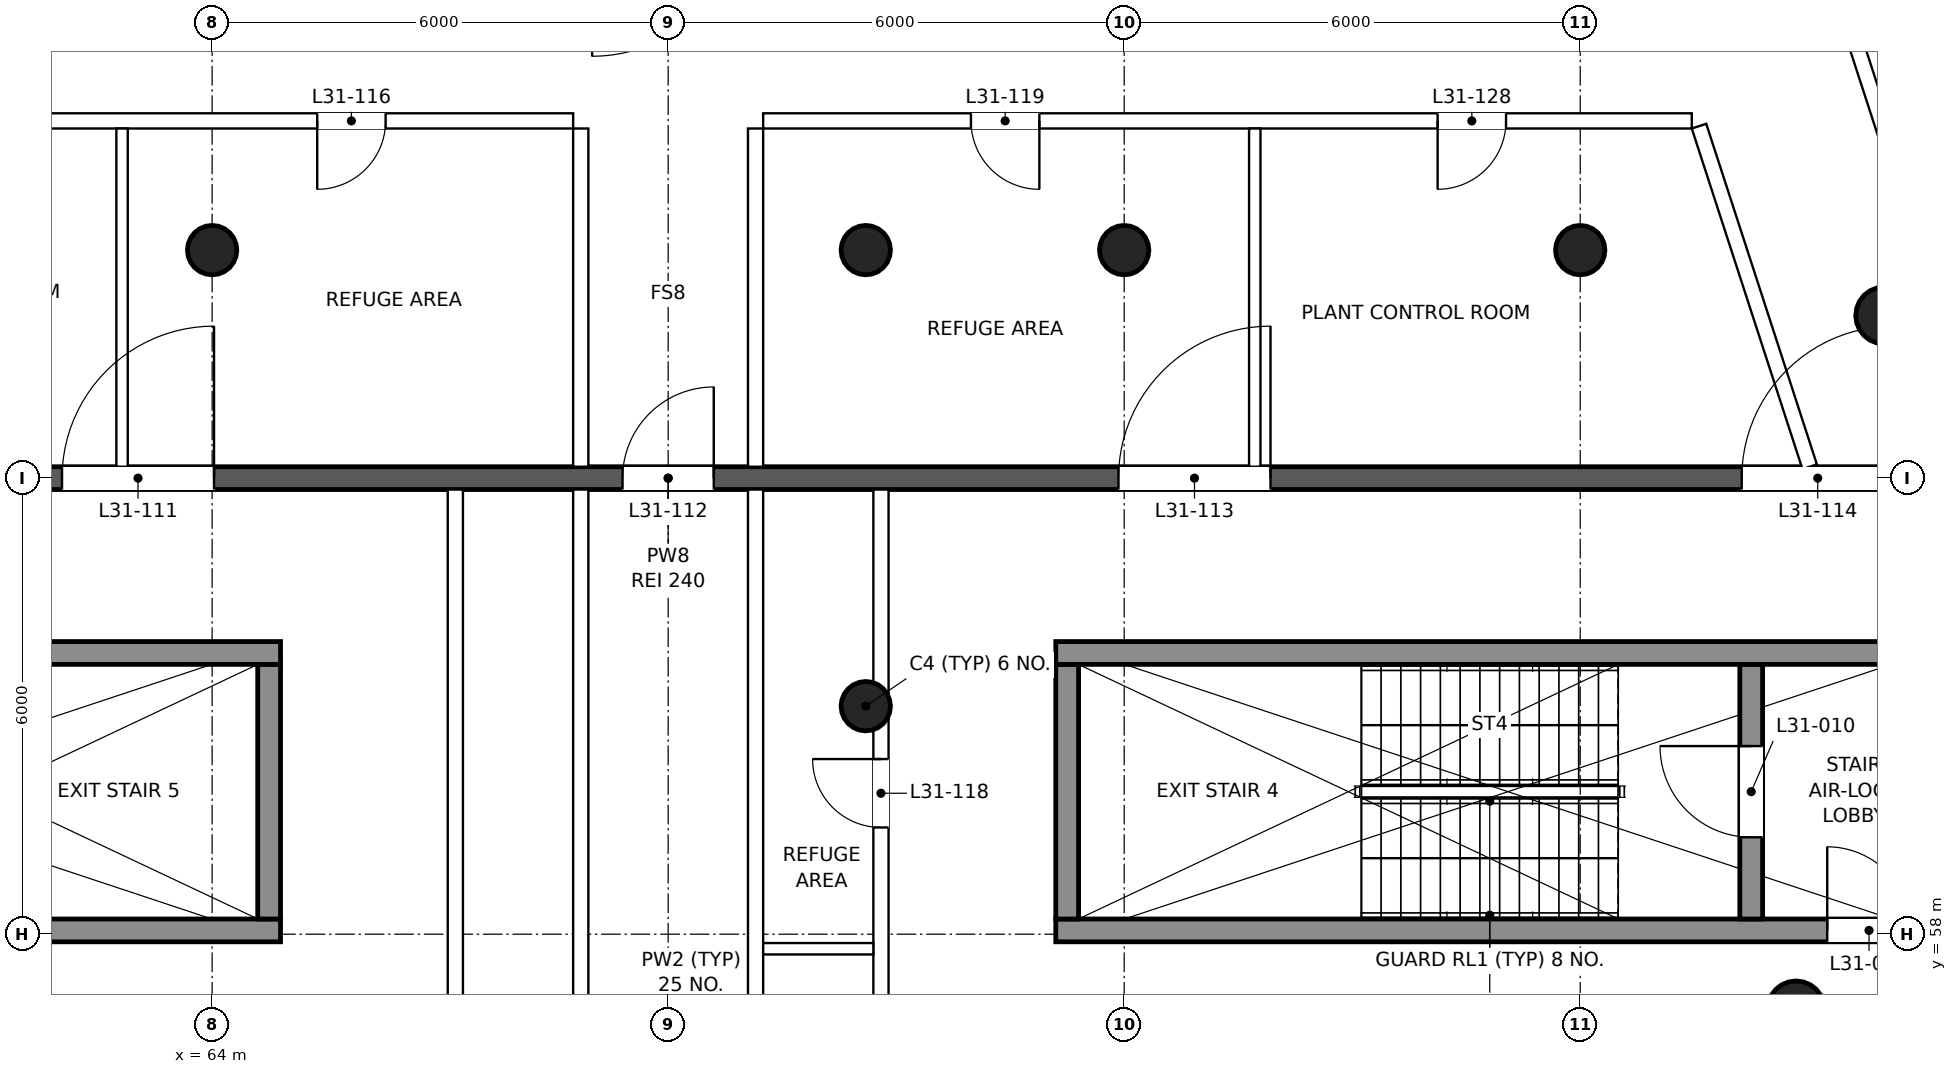
"""IFC4 building model, lengths in metres.
Left out: names, types, materials, properties, quantities, classifications, styles, units other than length and angle.
Written with IfcOpenShell. Run it as: python <this file> out.ifc"""

import sys

from ifc_helpers import new_model, si_unit, direction, frame, frame_2d, origin, origin_2d, place, context, subcontext, project, spatial, rectangle, circle, extrude, element, fill, save


model = new_model("IFC4")
c1 = context("Model", 3, precision=1e-05, world=origin(), true_north=direction((0.0, 1.0)))
c2 = subcontext(c1, "Body", "Model", "MODEL_VIEW")
j1 = project(units=[si_unit("LENGTHUNIT", "METRE"), si_unit("PLANEANGLEUNIT", "RADIAN")], contexts=[c1])
p1 = place(None, origin())
s1 = spatial("IfcSite", under=j1, at=p1, CompositionType="ELEMENT")
p2 = place(p1, origin())
s2 = spatial("IfcBuilding", under=s1, at=p2, CompositionType="ELEMENT")
p3 = place(p2, frame((0.0, 0.0, 137.6)))
s3 = spatial("IfcBuildingStorey", under=s2, at=p3, CompositionType="ELEMENT", Elevation=137.6)
for number, where, z_axis, x_axis in (
    (1, (84.84, 57.01, 0.0), (0.0, 0.0, 1.0), (1.0, 0.0, 0.0)),
    (2, (86.0, 66.14, 0.0), (0.0, 0.0, 1.0), (1.0, 0.0, 0.0)),
):
    element("IfcColumn", number, at=place(p3, frame(where, z_axis=z_axis, x_axis=x_axis)), inside=s3, PredefinedType="COLUMN", context=c2, shape_type="SweptSolid", body=[
        extrude(circle(Radius=0.375, at=origin_2d()), origin(), (0.0, 0.0, 1.0), 5.0),
    ])
for number, where, z_axis, x_axis in (
    (3, (64.0, 67.0, 0.0), (0.0, 0.0, 1.0), (1.0, 0.0, 0.0)),
    (4, (72.6, 61.0, 0.0), (0.0, 0.0, 1.0), (1.0, 0.0, 0.0)),
    (5, (72.6, 67.0, 0.0), (0.0, 0.0, 1.0), (1.0, 0.0, 0.0)),
    (6, (76.0, 67.0, 0.0), (0.0, 0.0, 1.0), (1.0, 0.0, 0.0)),
    (7, (82.0, 67.0, 0.0), (0.0, 0.0, 1.0), (1.0, 0.0, 0.0)),
):
    element("IfcColumn", number, at=place(p3, frame(where, z_axis=z_axis, x_axis=x_axis)), inside=s3, PredefinedType="COLUMN", context=c2, shape_type="SweptSolid", body=[
        extrude(circle(Radius=0.325, at=origin_2d()), origin(), (0.0, 0.0, 1.0), 5.0),
    ])
p4 = place(p3, frame((53.0, 58.05, 0.0), z_axis=(0.0, 0.0, 1.0), x_axis=(1.0, 0.0, 0.0)))
e8 = element("IfcWall", 8, at=p4, inside=s3, PredefinedType="SHEAR", context=c2, shape_type="SweptSolid", body=[
    extrude(rectangle(XDim=11.9, YDim=0.3, at=frame_2d((5.95, 0.0))), origin(), (0.0, 0.0, 1.0), 5.0),
])
p5 = place(p4, frame((0.65, 0.0, 0.0)))
e9 = element("IfcOpeningElement", 9, at=p5, cuts=e8, PredefinedType="OPENING", context=c2, shape_type="SweptSolid", body=[
    extrude(rectangle(XDim=1.1, YDim=2.1, at=frame_2d((0.55, 1.05))), frame((0.0, 0.16, 0.0), z_axis=(0.0, -1.0, 0.0), x_axis=(1.0, 0.0, 0.0)), (0.0, 0.0, 1.0), 0.32),
])
p6 = place(p3, frame((75.1, 58.05, 0.0), z_axis=(0.0, 0.0, 1.0), x_axis=(1.0, 0.0, 0.0)))
e10 = element("IfcWall", 10, at=p6, inside=s3, PredefinedType="SHEAR", context=c2, shape_type="SweptSolid", body=[
    extrude(rectangle(XDim=11.9, YDim=0.3, at=frame_2d((5.95, 0.0))), origin(), (0.0, 0.0, 1.0), 5.0),
])
p7 = place(p6, frame((10.15, 0.0, 0.0)))
e11 = element("IfcOpeningElement", 11, at=p7, cuts=e10, PredefinedType="OPENING", context=c2, shape_type="SweptSolid", body=[
    extrude(rectangle(XDim=1.1, YDim=2.1, at=frame_2d((0.55, 1.05))), frame((0.0, 0.16, 0.0), z_axis=(0.0, -1.0, 0.0), x_axis=(1.0, 0.0, 0.0)), (0.0, 0.0, 1.0), 0.32),
])
for number, where, z_axis, x_axis in (
    (12, (64.75, 58.2, 0.0), (0.0, 0.0, 1.0), (0.0, 1.0, 0.0)),
    (13, (75.25, 58.2, 0.0), (0.0, 0.0, 1.0), (0.0, 1.0, 0.0)),
):
    element("IfcWall", number, at=place(p3, frame(where, z_axis=z_axis, x_axis=x_axis)), inside=s3, PredefinedType="SHEAR", context=c2, shape_type="SweptSolid", body=[
        extrude(rectangle(XDim=3.35, YDim=0.3, at=frame_2d((1.675, 0.0))), origin(), (0.0, 0.0, 1.0), 5.0),
    ])
p8 = place(p3, frame((84.25, 58.2, 0.0), z_axis=(0.0, 0.0, 1.0), x_axis=(0.0, 1.0, 0.0)))
e14 = element("IfcWall", 14, at=p8, inside=s3, PredefinedType="SHEAR", context=c2, shape_type="SweptSolid", body=[
    extrude(rectangle(XDim=3.35, YDim=0.3, at=frame_2d((1.675, 0.0))), origin(), (0.0, 0.0, 1.0), 5.0),
])
p9 = place(p8, frame((1.075, 0.0, 0.0)))
e15 = element("IfcOpeningElement", 15, at=p9, cuts=e14, PredefinedType="OPENING", context=c2, shape_type="SweptSolid", body=[
    extrude(rectangle(XDim=1.2, YDim=2.1, at=frame_2d((0.6, 1.05))), frame((0.0, 0.16, 0.0), z_axis=(0.0, -1.0, 0.0), x_axis=(1.0, 0.0, 0.0)), (0.0, 0.0, 1.0), 0.32),
])
for number, where, z_axis, x_axis in (
    (16, (53.0, 61.7, 0.0), (0.0, 0.0, 1.0), (1.0, 0.0, 0.0)),
    (17, (75.1, 61.7, 0.0), (0.0, 0.0, 1.0), (1.0, 0.0, 0.0)),
):
    element("IfcWall", number, at=place(p3, frame(where, z_axis=z_axis, x_axis=x_axis)), inside=s3, PredefinedType="SHEAR", context=c2, shape_type="SweptSolid", body=[
        extrude(rectangle(XDim=11.9, YDim=0.3, at=frame_2d((5.95, 0.0))), origin(), (0.0, 0.0, 1.0), 5.0),
    ])
p10 = place(p3, frame((45.49, 64.0, 0.0), z_axis=(0.0, 0.0, 1.0), x_axis=(1.0, 0.0, 0.0)))
e18 = element("IfcWall", 18, at=p10, inside=s3, PredefinedType="PARTITIONING", context=c2, shape_type="SweptSolid", body=[
    extrude(rectangle(XDim=49.02, YDim=0.3, at=frame_2d((24.51, 0.0))), origin(), (0.0, 0.0, 1.0), 3.9),
])
p11 = place(p10, frame((8.385, 0.0, 0.0)))
e19 = element("IfcOpeningElement", 19, at=p11, cuts=e18, PredefinedType="OPENING", context=c2, shape_type="SweptSolid", body=[
    extrude(rectangle(XDim=2.0, YDim=2.1, at=frame_2d((1.0, 1.05))), frame((0.0, 0.16, 0.0), z_axis=(0.0, -1.0, 0.0), x_axis=(1.0, 0.0, 0.0)), (0.0, 0.0, 1.0), 0.32),
])
p12 = place(p10, frame((16.535, 0.0, 0.0)))
e20 = element("IfcOpeningElement", 20, at=p12, cuts=e18, PredefinedType="OPENING", context=c2, shape_type="SweptSolid", body=[
    extrude(rectangle(XDim=2.0, YDim=2.1, at=frame_2d((1.0, 1.05))), frame((0.0, 0.16, 0.0), z_axis=(0.0, -1.0, 0.0), x_axis=(1.0, 0.0, 0.0)), (0.0, 0.0, 1.0), 0.32),
])
p13 = place(p10, frame((23.91, 0.0, 0.0)))
e21 = element("IfcOpeningElement", 21, at=p13, cuts=e18, PredefinedType="OPENING", context=c2, shape_type="SweptSolid", body=[
    extrude(rectangle(XDim=1.2, YDim=2.1, at=frame_2d((0.6, 1.05))), frame((0.0, 0.16, 0.0), z_axis=(0.0, -1.0, 0.0), x_axis=(1.0, 0.0, 0.0)), (0.0, 0.0, 1.0), 0.32),
])
p14 = place(p10, frame((30.435, 0.0, 0.0)))
e22 = element("IfcOpeningElement", 22, at=p14, cuts=e18, PredefinedType="OPENING", context=c2, shape_type="SweptSolid", body=[
    extrude(rectangle(XDim=2.0, YDim=2.1, at=frame_2d((1.0, 1.05))), frame((0.0, 0.16, 0.0), z_axis=(0.0, -1.0, 0.0), x_axis=(1.0, 0.0, 0.0)), (0.0, 0.0, 1.0), 0.32),
])
p15 = place(p10, frame((38.635, 0.0, 0.0)))
e23 = element("IfcOpeningElement", 23, at=p15, cuts=e18, PredefinedType="OPENING", context=c2, shape_type="SweptSolid", body=[
    extrude(rectangle(XDim=2.0, YDim=2.1, at=frame_2d((1.0, 1.05))), frame((0.0, 0.16, 0.0), z_axis=(0.0, -1.0, 0.0), x_axis=(1.0, 0.0, 0.0)), (0.0, 0.0, 1.0), 0.32),
])
p16 = place(p3, frame((83.305, 76.868, 0.0), z_axis=(0.0, 0.0, 1.0), x_axis=(0.309005574406, -0.951060226792, 0.0)))
e24 = element("IfcWall", 24, at=p16, inside=s3, PredefinedType="PARTITIONING", context=c2, shape_type="SweptSolid", body=[
    extrude(rectangle(XDim=13.373, YDim=0.2, at=frame_2d((6.687, 0.0))), origin(), (0.0, 0.0, 1.0), 4.6),
])
p17 = place(p16, frame((1.841, 0.0, 0.0)))
e25 = element("IfcOpeningElement", 25, at=p17, cuts=e24, PredefinedType="OPENING", context=c2, shape_type="SweptSolid", body=[
    extrude(rectangle(XDim=0.9, YDim=2.1, at=frame_2d((0.45, 1.05))), frame((0.0, 0.11, 0.0), z_axis=(0.0, -1.0, 0.0), x_axis=(1.0, 0.0, 0.0)), (0.0, 0.0, 1.0), 0.22),
])
p18 = place(p16, frame((6.236, 0.0, 0.0)))
e26 = element("IfcOpeningElement", 26, at=p18, cuts=e24, PredefinedType="OPENING", context=c2, shape_type="SweptSolid", body=[
    extrude(rectangle(XDim=0.9, YDim=2.1, at=frame_2d((0.45, 1.05))), frame((0.0, 0.11, 0.0), z_axis=(0.0, -1.0, 0.0), x_axis=(1.0, 0.0, 0.0)), (0.0, 0.0, 1.0), 0.22),
])
p19 = place(p3, frame((85.019, 64.15, 0.0), z_axis=(0.0, 0.0, 1.0), x_axis=(-0.309036861841, 0.951050060735, 0.0)))
e27 = element("IfcWall", 27, at=p19, inside=s3, PredefinedType="PARTITIONING", context=c2, shape_type="SweptSolid", body=[
    extrude(rectangle(XDim=4.712, YDim=0.2, at=frame_2d((2.356, 0.0))), origin(), (0.0, 0.0, 1.0), 4.6),
])
p20 = place(p3, frame((83.468, 68.7, 0.0), z_axis=(0.0, 0.0, 1.0), x_axis=(-1.0, 0.0, 0.0)))
e28 = element("IfcWall", 28, at=p20, inside=s3, PredefinedType="PARTITIONING", context=c2, shape_type="SweptSolid", body=[
    extrude(rectangle(XDim=12.218, YDim=0.2, at=frame_2d((6.109, 0.0))), origin(), (0.0, 0.0, 1.0), 4.6),
])
p21 = place(p20, frame((8.584, 0.0, 0.0)))
e29 = element("IfcOpeningElement", 29, at=p21, cuts=e28, PredefinedType="OPENING", context=c2, shape_type="SweptSolid", body=[
    extrude(rectangle(XDim=0.9, YDim=2.1, at=frame_2d((0.45, 1.05))), frame((0.0, 0.11, 0.0), z_axis=(0.0, -1.0, 0.0), x_axis=(1.0, 0.0, 0.0)), (0.0, 0.0, 1.0), 0.22),
])
p22 = place(p20, frame((2.444, 0.0, 0.0)))
e30 = element("IfcOpeningElement", 30, at=p22, cuts=e28, PredefinedType="OPENING", context=c2, shape_type="SweptSolid", body=[
    extrude(rectangle(XDim=0.9, YDim=2.1, at=frame_2d((0.45, 1.05))), frame((0.0, 0.11, 0.0), z_axis=(0.0, -1.0, 0.0), x_axis=(1.0, 0.0, 0.0)), (0.0, 0.0, 1.0), 0.22),
])
p23 = place(p3, frame((71.15, 68.6, 0.0), z_axis=(0.0, 0.0, 1.0), x_axis=(0.0, -1.0, 0.0)))
e31 = element("IfcWall", 31, at=p23, inside=s3, PredefinedType="PARTITIONING", context=c2, shape_type="SweptSolid", body=[
    extrude(rectangle(XDim=4.45, YDim=0.2, at=frame_2d((2.225, 0.0))), origin(), (0.0, 0.0, 1.0), 4.6),
])
p24 = place(p3, frame((71.15, 63.85, 0.0), z_axis=(0.0, 0.0, 1.0), x_axis=(0.0, -1.0, 0.0)))
e32 = element("IfcWall", 32, at=p24, inside=s3, PredefinedType="PARTITIONING", context=c2, shape_type="SweptSolid", body=[
    extrude(rectangle(XDim=14.429, YDim=0.2, at=frame_2d((7.215, 0.0))), origin(), (0.0, 0.0, 1.0), 4.6),
])
p25 = place(p3, frame((72.8, 55.7, 0.0), z_axis=(0.0, 0.0, 1.0), x_axis=(0.0, 1.0, 0.0)))
e33 = element("IfcWall", 33, at=p25, inside=s3, PredefinedType="PARTITIONING", context=c2, shape_type="SweptSolid", body=[
    extrude(rectangle(XDim=8.15, YDim=0.2, at=frame_2d((4.075, 0.0))), origin(), (0.0, 0.0, 1.0), 4.6),
])
p26 = place(p25, frame((3.704, 0.0, 0.0)))
e34 = element("IfcOpeningElement", 34, at=p26, cuts=e33, PredefinedType="OPENING", context=c2, shape_type="SweptSolid", body=[
    extrude(rectangle(XDim=0.9, YDim=2.1, at=frame_2d((0.45, 1.05))), frame((0.0, 0.11, 0.0), z_axis=(0.0, -1.0, 0.0), x_axis=(1.0, 0.0, 0.0)), (0.0, 0.0, 1.0), 0.22),
])
p27 = place(p3, frame((68.85, 49.421, 0.0), z_axis=(0.0, 0.0, 1.0), x_axis=(0.0, 1.0, 0.0)))
e35 = element("IfcWall", 35, at=p27, inside=s3, PredefinedType="PARTITIONING", context=c2, shape_type="SweptSolid", body=[
    extrude(rectangle(XDim=14.429, YDim=0.2, at=frame_2d((7.215, 0.0))), origin(), (0.0, 0.0, 1.0), 4.6),
])
p28 = place(p27, frame((6.818, 0.0, 0.0)))
e36 = element("IfcOpeningElement", 36, at=p28, cuts=e35, PredefinedType="OPENING", context=c2, shape_type="SweptSolid", body=[
    extrude(rectangle(XDim=0.9, YDim=2.1, at=frame_2d((0.45, 1.05))), frame((0.0, 0.11, 0.0), z_axis=(0.0, -1.0, 0.0), x_axis=(1.0, 0.0, 0.0)), (0.0, 0.0, 1.0), 0.22),
])
p29 = place(p3, frame((68.85, 64.15, 0.0), z_axis=(0.0, 0.0, 1.0), x_axis=(0.0, 1.0, 0.0)))
e37 = element("IfcWall", 37, at=p29, inside=s3, PredefinedType="PARTITIONING", context=c2, shape_type="SweptSolid", body=[
    extrude(rectangle(XDim=4.45, YDim=0.2, at=frame_2d((2.225, 0.0))), origin(), (0.0, 0.0, 1.0), 4.6),
])
p30 = place(p3, frame((68.75, 68.7, 0.0), z_axis=(0.0, 0.0, 1.0), x_axis=(-1.0, 0.0, 0.0)))
e38 = element("IfcWall", 38, at=p30, inside=s3, PredefinedType="PARTITIONING", context=c2, shape_type="SweptSolid", body=[
    extrude(rectangle(XDim=12.218, YDim=0.2, at=frame_2d((6.109, 0.0))), origin(), (0.0, 0.0, 1.0), 4.6),
])
p31 = place(p30, frame((2.468, 0.0, 0.0)))
e39 = element("IfcOpeningElement", 39, at=p31, cuts=e38, PredefinedType="OPENING", context=c2, shape_type="SweptSolid", body=[
    extrude(rectangle(XDim=0.9, YDim=2.1, at=frame_2d((0.45, 1.05))), frame((0.0, 0.11, 0.0), z_axis=(0.0, -1.0, 0.0), x_axis=(1.0, 0.0, 0.0)), (0.0, 0.0, 1.0), 0.22),
])
p32 = place(p30, frame((8.467, 0.0, 0.0)))
e40 = element("IfcOpeningElement", 40, at=p32, cuts=e38, PredefinedType="OPENING", context=c2, shape_type="SweptSolid", body=[
    extrude(rectangle(XDim=0.9, YDim=2.1, at=frame_2d((0.45, 1.05))), frame((0.0, 0.11, 0.0), z_axis=(0.0, -1.0, 0.0), x_axis=(1.0, 0.0, 0.0)), (0.0, 0.0, 1.0), 0.22),
])
p33 = place(p3, frame((67.2, 63.85, 0.0), z_axis=(0.0, 0.0, 1.0), x_axis=(0.0, -1.0, 0.0)))
e41 = element("IfcWall", 41, at=p33, inside=s3, PredefinedType="PARTITIONING", context=c2, shape_type="SweptSolid", body=[
    extrude(rectangle(XDim=8.15, YDim=0.2, at=frame_2d((4.075, 0.0))), origin(), (0.0, 0.0, 1.0), 4.6),
])
p34 = place(p3, frame((62.815, 64.15, 0.0), z_axis=(0.0, 0.0, 1.0), x_axis=(0.0, 1.0, 0.0)))
e42 = element("IfcWall", 42, at=p34, inside=s3, PredefinedType="PARTITIONING", context=c2, shape_type="SweptSolid", body=[
    extrude(rectangle(XDim=4.45, YDim=0.15, at=frame_2d((2.225, 0.0))), origin(), (0.0, 0.0, 1.0), 4.6),
])
p35 = place(p3, frame((71.25, 57.809, 0.0), z_axis=(0.0, 0.0, 1.0), x_axis=(1.0, 0.0, 0.0)))
e43 = element("IfcWall", 43, at=p35, inside=s3, PredefinedType="PARTITIONING", context=c2, shape_type="SweptSolid", body=[
    extrude(rectangle(XDim=1.45, YDim=0.15, at=frame_2d((0.725, 0.0))), origin(), (0.0, 0.0, 1.0), 4.6),
])
p36 = place(p3, frame((77.718, 64.15, 0.0), z_axis=(0.0, 0.0, 1.0), x_axis=(0.0, 1.0, 0.0)))
e44 = element("IfcWall", 44, at=p36, inside=s3, PredefinedType="PARTITIONING", context=c2, shape_type="SweptSolid", body=[
    extrude(rectangle(XDim=4.45, YDim=0.15, at=frame_2d((2.225, 0.0))), origin(), (0.0, 0.0, 1.0), 4.6),
])
p37 = place(p7, origin())
e45 = element("IfcDoor", 45, at=p37, inside=s3, OperationType="SINGLE_SWING_LEFT", PredefinedType="DOOR", context=c2, shape_type="SweptSolid", body=[
    extrude(rectangle(XDim=1.1, YDim=2.1, at=frame_2d((0.55, 1.05))), frame((0.0, 0.025, 0.0), z_axis=(0.0, -1.0, 0.0), x_axis=(1.0, 0.0, 0.0)), (0.0, 0.0, 1.0), 0.05),
])
fill(e11, e45)
p38 = place(p9, origin())
e46 = element("IfcDoor", 46, at=p38, inside=s3, OperationType="SINGLE_SWING_RIGHT", PredefinedType="DOOR", context=c2, shape_type="SweptSolid", body=[
    extrude(rectangle(XDim=1.2, YDim=2.1, at=frame_2d((0.6, 1.05))), frame((0.0, 0.025, 0.0), z_axis=(0.0, -1.0, 0.0), x_axis=(1.0, 0.0, 0.0)), (0.0, 0.0, 1.0), 0.05),
])
fill(e15, e46)
p39 = place(p12, origin())
e47 = element("IfcDoor", 47, at=p39, inside=s3, OperationType="DOUBLE_DOOR_SINGLE_SWING", PredefinedType="DOOR", context=c2, shape_type="SweptSolid", body=[
    extrude(rectangle(XDim=2.0, YDim=2.1, at=frame_2d((1.0, 1.05))), frame((0.0, 0.025, 0.0), z_axis=(0.0, -1.0, 0.0), x_axis=(1.0, 0.0, 0.0)), (0.0, 0.0, 1.0), 0.05),
])
fill(e20, e47)
p40 = place(p13, origin())
e48 = element("IfcDoor", 48, at=p40, inside=s3, OperationType="SINGLE_SWING_RIGHT", PredefinedType="DOOR", context=c2, shape_type="SweptSolid", body=[
    extrude(rectangle(XDim=1.2, YDim=2.1, at=frame_2d((0.6, 1.05))), frame((0.0, 0.025, 0.0), z_axis=(0.0, -1.0, 0.0), x_axis=(1.0, 0.0, 0.0)), (0.0, 0.0, 1.0), 0.05),
])
fill(e21, e48)
p41 = place(p14, origin())
e49 = element("IfcDoor", 49, at=p41, inside=s3, OperationType="DOUBLE_DOOR_SINGLE_SWING", PredefinedType="DOOR", context=c2, shape_type="SweptSolid", body=[
    extrude(rectangle(XDim=2.0, YDim=2.1, at=frame_2d((1.0, 1.05))), frame((0.0, 0.025, 0.0), z_axis=(0.0, -1.0, 0.0), x_axis=(1.0, 0.0, 0.0)), (0.0, 0.0, 1.0), 0.05),
])
fill(e22, e49)
p42 = place(p15, origin())
e50 = element("IfcDoor", 50, at=p42, inside=s3, OperationType="DOUBLE_DOOR_SINGLE_SWING", PredefinedType="DOOR", context=c2, shape_type="SweptSolid", body=[
    extrude(rectangle(XDim=2.0, YDim=2.1, at=frame_2d((1.0, 1.05))), frame((0.0, 0.025, 0.0), z_axis=(0.0, -1.0, 0.0), x_axis=(1.0, 0.0, 0.0)), (0.0, 0.0, 1.0), 0.05),
])
fill(e23, e50)
p43 = place(p31, origin())
e51 = element("IfcDoor", 51, at=p43, inside=s3, OperationType="SINGLE_SWING_RIGHT", PredefinedType="DOOR", context=c2, shape_type="SweptSolid", body=[
    extrude(rectangle(XDim=0.9, YDim=2.1, at=frame_2d((0.45, 1.05))), frame((0.0, 0.025, 0.0), z_axis=(0.0, -1.0, 0.0), x_axis=(1.0, 0.0, 0.0)), (0.0, 0.0, 1.0), 0.05),
])
fill(e39, e51)
p44 = place(p26, origin())
e52 = element("IfcDoor", 52, at=p44, inside=s3, OperationType="SINGLE_SWING_RIGHT", PredefinedType="DOOR", context=c2, shape_type="SweptSolid", body=[
    extrude(rectangle(XDim=0.9, YDim=2.1, at=frame_2d((0.45, 1.05))), frame((0.0, 0.025, 0.0), z_axis=(0.0, -1.0, 0.0), x_axis=(1.0, 0.0, 0.0)), (0.0, 0.0, 1.0), 0.05),
])
fill(e34, e52)
p45 = place(p21, origin())
e53 = element("IfcDoor", 53, at=p45, inside=s3, OperationType="SINGLE_SWING_LEFT", PredefinedType="DOOR", context=c2, shape_type="SweptSolid", body=[
    extrude(rectangle(XDim=0.9, YDim=2.1, at=frame_2d((0.45, 1.05))), frame((0.0, 0.025, 0.0), z_axis=(0.0, -1.0, 0.0), x_axis=(1.0, 0.0, 0.0)), (0.0, 0.0, 1.0), 0.05),
])
fill(e29, e53)
p46 = place(p22, origin())
e54 = element("IfcDoor", 54, at=p46, inside=s3, OperationType="SINGLE_SWING_RIGHT", PredefinedType="DOOR", context=c2, shape_type="SweptSolid", body=[
    extrude(rectangle(XDim=0.9, YDim=2.1, at=frame_2d((0.45, 1.05))), frame((0.0, 0.025, 0.0), z_axis=(0.0, -1.0, 0.0), x_axis=(1.0, 0.0, 0.0)), (0.0, 0.0, 1.0), 0.05),
])
fill(e30, e54)
save(model, sys.argv[1])
